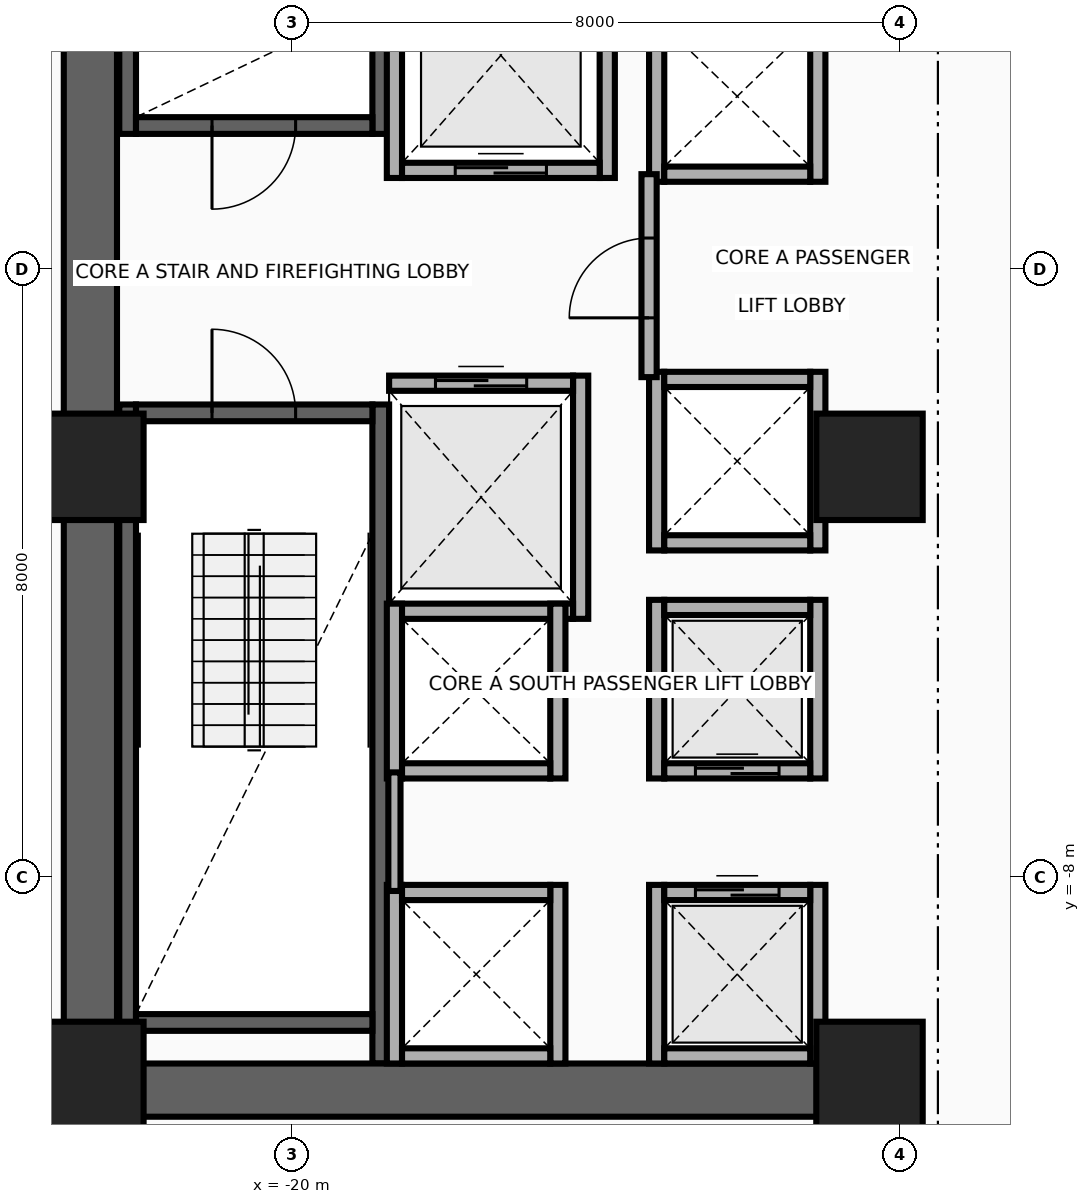
"""IFC4 building model, lengths in metres.
Left out: names, types, materials, properties, quantities, classifications, styles, units other than length and angle.
Written with IfcOpenShell. Run it as: python <this file> out.ifc"""

import sys

from ifc_helpers import new_model, si_unit, direction, frame, frame_2d, origin, origin_2d, place, context, subcontext, project, spatial, rectangle, extrude, source, transform, mapped, element, fill, save


model = new_model("IFC4")
c1 = context("Model", 3, precision=1e-05, world=origin(), true_north=direction((0.0, 1.0)))
c2 = subcontext(c1, "Body", "Model", "MODEL_VIEW")
j1 = project(units=[si_unit("LENGTHUNIT", "METRE"), si_unit("PLANEANGLEUNIT", "RADIAN")], contexts=[c1])
p1 = place(None, origin())
s1 = spatial("IfcSite", under=j1, at=p1, CompositionType="ELEMENT")
p2 = place(p1, origin())
s2 = spatial("IfcBuilding", under=s1, at=p2, CompositionType="ELEMENT")
p3 = place(p2, frame((0.0, 0.0, 77.8)))
s3 = spatial("IfcBuildingStorey", under=s2, at=p3, CompositionType="ELEMENT", Elevation=77.8)
for number, where, z_axis, x_axis in (
    (1, (-22.16, 1.78, 0.0), (0.0, 0.0, 1.0), (0.0, 1.0, 0.0)),
    (2, (-18.83, 1.78, 0.0), (0.0, 0.0, 1.0), (0.0, 1.0, 0.0)),
):
    element("IfcWall", number, at=place(p3, frame(where, z_axis=z_axis, x_axis=x_axis)), inside=s3, PredefinedType="SHEAR", context=c2, shape_type="SweptSolid", body=[
        extrude(rectangle(XDim=8.67, YDim=0.22, at=frame_2d((4.335, 0.0))), origin(), (0.0, 0.0, 1.0), 3.46),
    ])
p4 = place(p3, frame((-22.05, 1.89, 0.0), z_axis=(0.0, 0.0, 1.0), x_axis=(1.0, 0.0, 0.0)))
e3 = element("IfcWall", 3, at=p4, inside=s3, PredefinedType="SHEAR", context=c2, shape_type="SweptSolid", body=[
    extrude(rectangle(XDim=3.11, YDim=0.22, at=frame_2d((1.555, 0.0))), origin(), (0.0, 0.0, 1.0), 3.46),
])
p5 = place(p4, frame((1.0, 0.0, 0.0)))
e4 = element("IfcOpeningElement", 4, at=p5, cuts=e3, PredefinedType="OPENING", context=c2, shape_type="SweptSolid", body=[
    extrude(rectangle(XDim=1.1, YDim=2.15, at=frame_2d((0.55, 1.075))), frame((0.0, 0.125, 0.0), z_axis=(0.0, -1.0, 0.0), x_axis=(1.0, 0.0, 0.0)), (0.0, 0.0, 1.0), 0.25),
])
for number, where, z_axis, x_axis in (
    (5, (-22.16, -10.45, 0.0), (0.0, 0.0, 1.0), (0.0, 1.0, 0.0)),
    (6, (-18.83, -10.45, 0.0), (0.0, 0.0, 1.0), (0.0, 1.0, 0.0)),
):
    element("IfcWall", number, at=place(p3, frame(where, z_axis=z_axis, x_axis=x_axis)), inside=s3, PredefinedType="SHEAR", context=c2, shape_type="SweptSolid", body=[
        extrude(rectangle(XDim=8.67, YDim=0.22, at=frame_2d((4.335, 0.0))), origin(), (0.0, 0.0, 1.0), 3.46),
    ])
p6 = place(p3, frame((-22.05, -9.91, 0.0), z_axis=(0.0, 0.0, 1.0), x_axis=(1.0, 0.0, 0.0)))
e7 = element("IfcWall", 7, at=p6, inside=s3, PredefinedType="SHEAR", context=c2, shape_type="SweptSolid", body=[
    extrude(rectangle(XDim=3.11, YDim=0.22, at=frame_2d((1.555, 0.0))), origin(), (0.0, 0.0, 1.0), 3.46),
])
p7 = place(p3, frame((-22.05, -1.89, 0.0), z_axis=(0.0, 0.0, 1.0), x_axis=(1.0, 0.0, 0.0)))
e8 = element("IfcWall", 8, at=p7, inside=s3, PredefinedType="SHEAR", context=c2, shape_type="SweptSolid", body=[
    extrude(rectangle(XDim=3.11, YDim=0.22, at=frame_2d((1.555, 0.0))), origin(), (0.0, 0.0, 1.0), 3.46),
])
p8 = place(p7, frame((1.0, 0.0, 0.0)))
e9 = element("IfcOpeningElement", 9, at=p8, cuts=e8, PredefinedType="OPENING", context=c2, shape_type="SweptSolid", body=[
    extrude(rectangle(XDim=1.1, YDim=2.15, at=frame_2d((0.55, 1.075))), frame((0.0, 0.125, 0.0), z_axis=(0.0, -1.0, 0.0), x_axis=(1.0, 0.0, 0.0)), (0.0, 0.0, 1.0), 0.25),
])
p9 = place(p3, frame((-22.65, -11.15, 0.0), z_axis=(0.0, 0.0, 1.0), x_axis=(0.0, 1.0, 0.0)))
e10 = element("IfcWall", 10, at=p9, inside=s3, PredefinedType="SHEAR", context=c2, shape_type="SweptSolid", body=[
    extrude(rectangle(XDim=22.3, YDim=0.7, at=frame_2d((11.15, 0.0))), origin(), (0.0, 0.0, 1.0), 3.46),
])
p10 = place(p3, frame((-22.65, -10.8, 0.0), z_axis=(0.0, 0.0, 1.0), x_axis=(1.0, 0.0, 0.0)))
e11 = element("IfcWall", 11, at=p10, inside=s3, PredefinedType="SHEAR", context=c2, shape_type="SweptSolid", body=[
    extrude(rectangle(XDim=10.25, YDim=0.7, at=frame_2d((5.125, 0.0))), origin(), (0.0, 0.0, 1.0), 3.46),
])
m1 = source(origin(), c2, "Body", "SweptSolid", [
    extrude(rectangle(XDim=1.4, YDim=1.4, at=origin_2d()), origin(), (0.0, 0.0, 1.0), 3.7),
])
for number, where, z_axis, x_axis in (
    (12, (-22.65, -10.6, 0.0), (0.0, 0.0, 1.0), (1.0, 0.0, 0.0)),
    (13, (-12.4, -10.6, 0.0), (0.0, 0.0, 1.0), (1.0, 0.0, 0.0)),
    (14, (-22.65, -2.6, 0.0), (0.0, 0.0, 1.0), (1.0, 0.0, 0.0)),
    (15, (-12.4, -2.6, 0.0), (0.0, 0.0, 1.0), (1.0, 0.0, 0.0)),
):
    element("IfcColumn", number, at=place(p3, frame(where, z_axis=z_axis, x_axis=x_axis)), inside=s3, PredefinedType="COLUMN", context=c2, shape_type="MappedRepresentation", body=[
        mapped(m1, transform((0.0, 0.0, 0.0), x_axis=(1.0, 0.0, 0.0), y_axis=(0.0, 1.0, 0.0), z_axis=(0.0, 0.0, 1.0), scale=1.0)),
    ])
for number, where, z_axis, x_axis in (
    (16, (-18.65, 1.2, 0.0), (0.0, 0.0, 1.0), (0.0, 1.0, 0.0)),
    (17, (-15.85, 1.2, 0.0), (0.0, 0.0, 1.0), (0.0, 1.0, 0.0)),
):
    element("IfcWall", number, at=place(p3, frame(where, z_axis=z_axis, x_axis=x_axis)), inside=s3, PredefinedType="MOVABLE", context=c2, shape_type="SweptSolid", body=[
        extrude(rectangle(XDim=3.225, YDim=0.2, at=frame_2d((1.613, 0.0))), origin(), (0.0, 0.0, 1.0), 3.46),
    ])
p11 = place(p3, frame((-18.55, 1.3, 0.0), z_axis=(0.0, 0.0, 1.0), x_axis=(1.0, 0.0, 0.0)))
e18 = element("IfcWall", 18, at=p11, inside=s3, PredefinedType="MOVABLE", context=c2, shape_type="SweptSolid", body=[
    extrude(rectangle(XDim=2.6, YDim=0.2, at=frame_2d((1.3, 0.0))), origin(), (0.0, 0.0, 1.0), 3.46),
])
p12 = place(p11, frame((0.7, 0.0, 0.0)))
e19 = element("IfcOpeningElement", 19, at=p12, cuts=e18, PredefinedType="OPENING", context=c2, shape_type="SweptSolid", body=[
    extrude(rectangle(XDim=1.2, YDim=2.1, at=frame_2d((0.6, 1.05))), frame((0.0, 0.115, 0.0), z_axis=(0.0, -1.0, 0.0), x_axis=(1.0, 0.0, 0.0)), (0.0, 0.0, 1.0), 0.23),
])
p13 = place(p3, frame((-16.2, -4.6, 0.0), z_axis=(0.0, 0.0, 1.0), x_axis=(0.0, 1.0, 0.0)))
e20 = element("IfcWall", 20, at=p13, inside=s3, PredefinedType="MOVABLE", context=c2, shape_type="SweptSolid", body=[
    extrude(rectangle(XDim=3.2, YDim=0.2, at=frame_2d((1.6, 0.0))), origin(), (0.0, 0.0, 1.0), 3.46),
])
p14 = place(p3, frame((-18.72, -4.5, 0.0), z_axis=(0.0, 0.0, 1.0), x_axis=(1.0, 0.0, 0.0)))
e21 = element("IfcWall", 21, at=p14, inside=s3, PredefinedType="MOVABLE", context=c2, shape_type="SweptSolid", body=[
    extrude(rectangle(XDim=2.42, YDim=0.2, at=frame_2d((1.21, 0.0))), origin(), (0.0, 0.0, 1.0), 3.46),
])
p15 = place(p3, frame((-18.72, -1.5, 0.0), z_axis=(0.0, 0.0, 1.0), x_axis=(1.0, 0.0, 0.0)))
e22 = element("IfcWall", 22, at=p15, inside=s3, PredefinedType="MOVABLE", context=c2, shape_type="SweptSolid", body=[
    extrude(rectangle(XDim=2.42, YDim=0.2, at=frame_2d((1.21, 0.0))), origin(), (0.0, 0.0, 1.0), 3.46),
])
p16 = place(p15, frame((0.61, 0.0, 0.0)))
e23 = element("IfcOpeningElement", 23, at=p16, cuts=e22, PredefinedType="OPENING", context=c2, shape_type="SweptSolid", body=[
    extrude(rectangle(XDim=1.2, YDim=2.1, at=frame_2d((0.6, 1.05))), frame((0.0, 0.115, 0.0), z_axis=(0.0, -1.0, 0.0), x_axis=(1.0, 0.0, 0.0)), (0.0, 0.0, 1.0), 0.23),
])
for number, where, z_axis, x_axis in (
    (24, (-15.2, -10.45, 0.0), (0.0, 0.0, 1.0), (0.0, 1.0, 0.0)),
    (25, (-13.08, -10.45, 0.0), (0.0, 0.0, 1.0), (0.0, 1.0, 0.0)),
):
    element("IfcWall", number, at=place(p3, frame(where, z_axis=z_axis, x_axis=x_axis)), inside=s3, PredefinedType="MOVABLE", context=c2, shape_type="SweptSolid", body=[
        extrude(rectangle(XDim=2.35, YDim=0.2, at=frame_2d((1.175, 0.0))), origin(), (0.0, 0.0, 1.0), 2.583),
    ])
p17 = place(p3, frame((-15.1, -10.35, 0.0), z_axis=(0.0, 0.0, 1.0), x_axis=(1.0, 0.0, 0.0)))
e26 = element("IfcWall", 26, at=p17, inside=s3, PredefinedType="MOVABLE", context=c2, shape_type="SweptSolid", body=[
    extrude(rectangle(XDim=1.92, YDim=0.2, at=frame_2d((0.96, 0.0))), origin(), (0.0, 0.0, 1.0), 2.583),
])
p18 = place(p3, frame((-15.1, -8.2, 0.0), z_axis=(0.0, 0.0, 1.0), x_axis=(1.0, 0.0, 0.0)))
e27 = element("IfcWall", 27, at=p18, inside=s3, PredefinedType="MOVABLE", context=c2, shape_type="SweptSolid", body=[
    extrude(rectangle(XDim=1.92, YDim=0.2, at=frame_2d((0.96, 0.0))), origin(), (0.0, 0.0, 1.0), 3.46),
])
p19 = place(p18, frame((0.41, 0.0, 0.0)))
e28 = element("IfcOpeningElement", 28, at=p19, cuts=e27, PredefinedType="OPENING", context=c2, shape_type="SweptSolid", body=[
    extrude(rectangle(XDim=1.1, YDim=2.1, at=frame_2d((0.55, 1.05))), frame((0.0, 0.115, 0.0), z_axis=(0.0, -1.0, 0.0), x_axis=(1.0, 0.0, 0.0)), (0.0, 0.0, 1.0), 0.23),
])
for number, where, z_axis, x_axis in (
    (29, (-15.2, -6.7, 0.0), (0.0, 0.0, 1.0), (0.0, 1.0, 0.0)),
    (30, (-13.08, -6.7, 0.0), (0.0, 0.0, 1.0), (0.0, 1.0, 0.0)),
):
    element("IfcWall", number, at=place(p3, frame(where, z_axis=z_axis, x_axis=x_axis)), inside=s3, PredefinedType="MOVABLE", context=c2, shape_type="SweptSolid", body=[
        extrude(rectangle(XDim=2.35, YDim=0.2, at=frame_2d((1.175, 0.0))), origin(), (0.0, 0.0, 1.0), 3.46),
    ])
p20 = place(p3, frame((-15.1, -6.6, 0.0), z_axis=(0.0, 0.0, 1.0), x_axis=(1.0, 0.0, 0.0)))
e31 = element("IfcWall", 31, at=p20, inside=s3, PredefinedType="MOVABLE", context=c2, shape_type="SweptSolid", body=[
    extrude(rectangle(XDim=1.92, YDim=0.2, at=frame_2d((0.96, 0.0))), origin(), (0.0, 0.0, 1.0), 3.46),
])
p21 = place(p20, frame((0.41, 0.0, 0.0)))
e32 = element("IfcOpeningElement", 32, at=p21, cuts=e31, PredefinedType="OPENING", context=c2, shape_type="SweptSolid", body=[
    extrude(rectangle(XDim=1.1, YDim=2.1, at=frame_2d((0.55, 1.05))), frame((0.0, 0.115, 0.0), z_axis=(0.0, -1.0, 0.0), x_axis=(1.0, 0.0, 0.0)), (0.0, 0.0, 1.0), 0.23),
])
p22 = place(p3, frame((-15.1, -4.45, 0.0), z_axis=(0.0, 0.0, 1.0), x_axis=(1.0, 0.0, 0.0)))
e33 = element("IfcWall", 33, at=p22, inside=s3, PredefinedType="MOVABLE", context=c2, shape_type="SweptSolid", body=[
    extrude(rectangle(XDim=1.92, YDim=0.2, at=frame_2d((0.96, 0.0))), origin(), (0.0, 0.0, 1.0), 3.46),
])
for number, where, z_axis, x_axis in (
    (34, (-18.65, -10.45, 0.0), (0.0, 0.0, 1.0), (0.0, 1.0, 0.0)),
    (35, (-16.5, -10.45, 0.0), (0.0, 0.0, 1.0), (0.0, 1.0, 0.0)),
):
    element("IfcWall", number, at=place(p3, frame(where, z_axis=z_axis, x_axis=x_axis)), inside=s3, PredefinedType="MOVABLE", context=c2, shape_type="SweptSolid", body=[
        extrude(rectangle(XDim=2.35, YDim=0.2, at=frame_2d((1.175, 0.0))), origin(), (0.0, 0.0, 1.0), 2.583),
    ])
p23 = place(p3, frame((-18.55, -10.35, 0.0), z_axis=(0.0, 0.0, 1.0), x_axis=(1.0, 0.0, 0.0)))
e36 = element("IfcWall", 36, at=p23, inside=s3, PredefinedType="MOVABLE", context=c2, shape_type="SweptSolid", body=[
    extrude(rectangle(XDim=1.95, YDim=0.2, at=frame_2d((0.975, 0.0))), origin(), (0.0, 0.0, 1.0), 2.583),
])
p24 = place(p3, frame((-18.55, -8.2, 0.0), z_axis=(0.0, 0.0, 1.0), x_axis=(1.0, 0.0, 0.0)))
e37 = element("IfcWall", 37, at=p24, inside=s3, PredefinedType="MOVABLE", context=c2, shape_type="SweptSolid", body=[
    extrude(rectangle(XDim=1.95, YDim=0.2, at=frame_2d((0.975, 0.0))), origin(), (0.0, 0.0, 1.0), 3.46),
])
for number, where, z_axis, x_axis in (
    (38, (-15.2, 1.15, 0.0), (0.0, 0.0, 1.0), (0.0, 1.0, 0.0)),
    (39, (-13.08, 1.15, 0.0), (0.0, 0.0, 1.0), (0.0, 1.0, 0.0)),
):
    element("IfcWall", number, at=place(p3, frame(where, z_axis=z_axis, x_axis=x_axis)), inside=s3, PredefinedType="MOVABLE", context=c2, shape_type="SweptSolid", body=[
        extrude(rectangle(XDim=2.25, YDim=0.2, at=frame_2d((1.125, 0.0))), origin(), (0.0, 0.0, 1.0), 3.46),
    ])
p25 = place(p3, frame((-15.1, 1.25, 0.0), z_axis=(0.0, 0.0, 1.0), x_axis=(1.0, 0.0, 0.0)))
e40 = element("IfcWall", 40, at=p25, inside=s3, PredefinedType="MOVABLE", context=c2, shape_type="SweptSolid", body=[
    extrude(rectangle(XDim=1.92, YDim=0.2, at=frame_2d((0.96, 0.0))), origin(), (0.0, 0.0, 1.0), 3.46),
])
for number, where, z_axis, x_axis in (
    (41, (-18.65, -6.7, 0.0), (0.0, 0.0, 1.0), (0.0, 1.0, 0.0)),
    (42, (-16.5, -6.7, 0.0), (0.0, 0.0, 1.0), (0.0, 1.0, 0.0)),
):
    element("IfcWall", number, at=place(p3, frame(where, z_axis=z_axis, x_axis=x_axis)), inside=s3, PredefinedType="MOVABLE", context=c2, shape_type="SweptSolid", body=[
        extrude(rectangle(XDim=2.3, YDim=0.2, at=frame_2d((1.15, 0.0))), origin(), (0.0, 0.0, 1.0), 3.46),
    ])
p26 = place(p3, frame((-18.55, -6.6, 0.0), z_axis=(0.0, 0.0, 1.0), x_axis=(1.0, 0.0, 0.0)))
e43 = element("IfcWall", 43, at=p26, inside=s3, PredefinedType="MOVABLE", context=c2, shape_type="SweptSolid", body=[
    extrude(rectangle(XDim=1.95, YDim=0.2, at=frame_2d((0.975, 0.0))), origin(), (0.0, 0.0, 1.0), 3.46),
])
for number, where, z_axis, x_axis in (
    (44, (-15.2, -3.7, 0.0), (0.0, 0.0, 1.0), (0.0, 1.0, 0.0)),
    (45, (-13.08, -3.7, 0.0), (0.0, 0.0, 1.0), (0.0, 1.0, 0.0)),
):
    element("IfcWall", number, at=place(p3, frame(where, z_axis=z_axis, x_axis=x_axis)), inside=s3, PredefinedType="MOVABLE", context=c2, shape_type="SweptSolid", body=[
        extrude(rectangle(XDim=2.35, YDim=0.2, at=frame_2d((1.175, 0.0))), origin(), (0.0, 0.0, 1.0), 3.46),
    ])
for number, where, z_axis, x_axis in (
    (46, (-15.1, -3.6, 0.0), (0.0, 0.0, 1.0), (1.0, 0.0, 0.0)),
    (47, (-15.1, -1.45, 0.0), (0.0, 0.0, 1.0), (1.0, 0.0, 0.0)),
):
    element("IfcWall", number, at=place(p3, frame(where, z_axis=z_axis, x_axis=x_axis)), inside=s3, PredefinedType="MOVABLE", context=c2, shape_type="SweptSolid", body=[
        extrude(rectangle(XDim=1.92, YDim=0.2, at=frame_2d((0.96, 0.0))), origin(), (0.0, 0.0, 1.0), 3.46),
    ])
p27 = place(p3, frame((-15.3, -1.42, 0.0), z_axis=(0.0, 0.0, 1.0), x_axis=(0.0, 1.0, 0.0)))
e48 = element("IfcWall", 48, at=p27, inside=s3, PredefinedType="PARTITIONING", context=c2, shape_type="SweptSolid", body=[
    extrude(rectangle(XDim=2.67, YDim=0.2, at=frame_2d((1.335, 0.0))), origin(), (0.0, 0.0, 1.0), 3.46),
])
p28 = place(p27, frame((0.78, 0.0, 0.0)))
e49 = element("IfcOpeningElement", 49, at=p28, cuts=e48, PredefinedType="OPENING", context=c2, shape_type="SweptSolid", body=[
    extrude(rectangle(XDim=1.05, YDim=2.15, at=frame_2d((0.525, 1.075))), frame((0.0, 0.115, 0.0), z_axis=(0.0, -1.0, 0.0), x_axis=(1.0, 0.0, 0.0)), (0.0, 0.0, 1.0), 0.23),
])
p29 = place(p3, frame((-18.65, -8.18, 0.0), z_axis=(0.0, 0.0, 1.0), x_axis=(0.0, 1.0, 0.0)))
e50 = element("IfcWall", 50, at=p29, inside=s3, PredefinedType="PARTITIONING", context=c2, shape_type="SweptSolid", body=[
    extrude(rectangle(XDim=1.56, YDim=0.16, at=frame_2d((0.78, 0.0))), origin(), (0.0, 0.0, 1.0), 3.46),
])
p30 = place(p12, origin())
e51 = element("IfcDoor", 51, at=p30, inside=s3, OperationType="DOUBLE_DOOR_SLIDING", PredefinedType="DOOR", context=c2, shape_type="SweptSolid", body=[
    extrude(rectangle(XDim=1.2, YDim=2.1, at=frame_2d((0.6, 1.05))), frame((0.0, 0.025, 0.0), z_axis=(0.0, -1.0, 0.0), x_axis=(1.0, 0.0, 0.0)), (0.0, 0.0, 1.0), 0.05),
])
fill(e19, e51)
p31 = place(p16, origin())
e52 = element("IfcDoor", 52, at=p31, inside=s3, OperationType="DOUBLE_DOOR_SLIDING", PredefinedType="DOOR", context=c2, shape_type="SweptSolid", body=[
    extrude(rectangle(XDim=1.2, YDim=2.1, at=frame_2d((0.6, 1.05))), frame((0.0, 0.025, 0.0), z_axis=(0.0, -1.0, 0.0), x_axis=(1.0, 0.0, 0.0)), (0.0, 0.0, 1.0), 0.05),
])
fill(e23, e52)
p32 = place(p19, origin())
e53 = element("IfcDoor", 53, at=p32, inside=s3, OperationType="DOUBLE_DOOR_SLIDING", PredefinedType="DOOR", context=c2, shape_type="SweptSolid", body=[
    extrude(rectangle(XDim=1.1, YDim=2.1, at=frame_2d((0.55, 1.05))), frame((0.0, 0.025, 0.0), z_axis=(0.0, -1.0, 0.0), x_axis=(1.0, 0.0, 0.0)), (0.0, 0.0, 1.0), 0.05),
])
fill(e28, e53)
p33 = place(p21, origin())
e54 = element("IfcDoor", 54, at=p33, inside=s3, OperationType="DOUBLE_DOOR_SLIDING", PredefinedType="DOOR", context=c2, shape_type="SweptSolid", body=[
    extrude(rectangle(XDim=1.1, YDim=2.1, at=frame_2d((0.55, 1.05))), frame((0.0, 0.025, 0.0), z_axis=(0.0, -1.0, 0.0), x_axis=(1.0, 0.0, 0.0)), (0.0, 0.0, 1.0), 0.05),
])
fill(e32, e54)
p34 = place(p28, origin())
e55 = element("IfcDoor", 55, at=p34, inside=s3, OperationType="SINGLE_SWING_RIGHT", PredefinedType="DOOR", context=c2, shape_type="SweptSolid", body=[
    extrude(rectangle(XDim=1.05, YDim=2.15, at=frame_2d((0.525, 1.075))), frame((0.0, 0.025, 0.0), z_axis=(0.0, -1.0, 0.0), x_axis=(1.0, 0.0, 0.0)), (0.0, 0.0, 1.0), 0.05),
])
fill(e49, e55)
p35 = place(p5, frame((1.1, 0.0, 0.0), z_axis=(0.0, 0.0, 1.0), x_axis=(-1.0, 0.0, 0.0)))
e56 = element("IfcDoor", 56, at=p35, inside=s3, OperationType="SINGLE_SWING_LEFT", PredefinedType="DOOR", context=c2, shape_type="SweptSolid", body=[
    extrude(rectangle(XDim=1.1, YDim=2.15, at=frame_2d((0.55, 1.075))), frame((0.0, 0.025, 0.0), z_axis=(0.0, -1.0, 0.0), x_axis=(1.0, 0.0, 0.0)), (0.0, 0.0, 1.0), 0.05),
])
fill(e4, e56)
p36 = place(p8, origin())
e57 = element("IfcDoor", 57, at=p36, inside=s3, OperationType="SINGLE_SWING_RIGHT", PredefinedType="DOOR", context=c2, shape_type="SweptSolid", body=[
    extrude(rectangle(XDim=1.1, YDim=2.15, at=frame_2d((0.55, 1.075))), frame((0.0, 0.025, 0.0), z_axis=(0.0, -1.0, 0.0), x_axis=(1.0, 0.0, 0.0)), (0.0, 0.0, 1.0), 0.05),
])
fill(e9, e57)
save(model, sys.argv[1])
